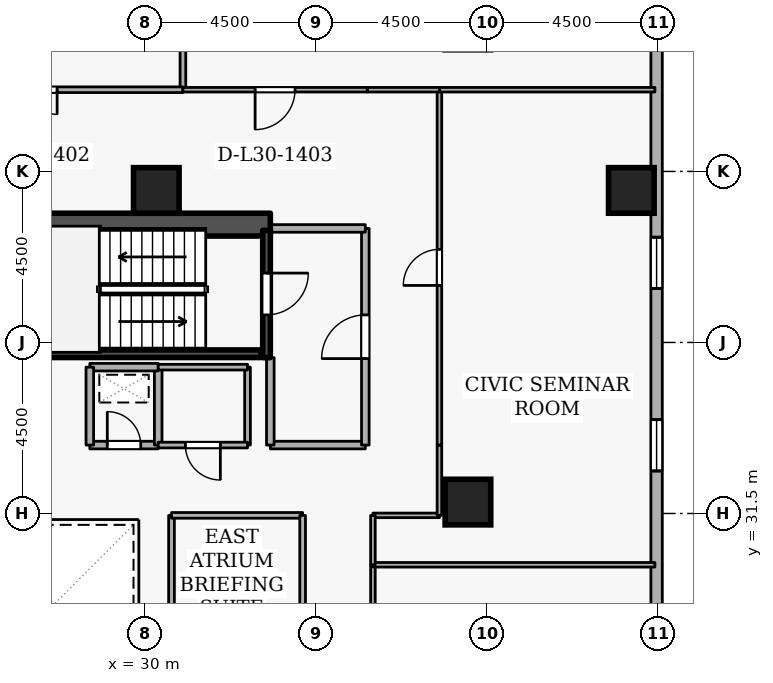
"""IFC4 building model, lengths in metres.
Left out: names, types, materials, properties, quantities, classifications, styles, units other than length and angle.
Written with IfcOpenShell. Run it as: python <this file> out.ifc"""

import sys

from ifc_helpers import new_model, si_unit, direction, frame, frame_2d, origin, origin_2d, place, context, subcontext, project, spatial, rectangle, extrude, element, fill, save


model = new_model("IFC4")
c1 = context("Model", 3, precision=1e-05, world=origin(), true_north=direction((0.0, 1.0)))
c2 = subcontext(c1, "Body", "Model", "MODEL_VIEW")
j1 = project(units=[si_unit("LENGTHUNIT", "METRE"), si_unit("PLANEANGLEUNIT", "RADIAN")], contexts=[c1])
p1 = place(None, origin())
s1 = spatial("IfcSite", under=j1, at=p1, CompositionType="ELEMENT")
p2 = place(p1, origin())
s2 = spatial("IfcBuilding", under=s1, at=p2, CompositionType="ELEMENT")
p3 = place(p2, frame((0.0, 0.0, 116.1)))
s3 = spatial("IfcBuildingStorey", under=s2, at=p3, CompositionType="ELEMENT", Elevation=116.1)
p4 = place(p3, frame((17.7, 39.1, 0.0), z_axis=(0.0, 0.0, 1.0), x_axis=(1.0, 0.0, 0.0)))
e1 = element("IfcWall", 1, at=p4, inside=s3, PredefinedType="SHEAR", context=c2, shape_type="SweptSolid", body=[
    extrude(rectangle(XDim=15.6, YDim=0.6, at=frame_2d((7.8, 0.0))), origin(), (0.0, 0.0, 1.0), 3.6),
])
for number, where, z_axis, x_axis in (
    (2, (42.8, 40.0, 0.0), (0.0, 0.0, 1.0), (1.0, 0.0, 0.0)),
    (3, (38.5, 31.8, 0.0), (0.0, 0.0, 1.0), (1.0, 0.0, 0.0)),
    (4, (30.3, 40.0, 0.0), (0.0, 0.0, 1.0), (1.0, 0.0, 0.0)),
):
    element("IfcColumn", number, at=place(p3, frame(where, z_axis=z_axis, x_axis=x_axis)), inside=s3, PredefinedType="COLUMN", context=c2, shape_type="SweptSolid", body=[
        extrude(rectangle(XDim=1.2, YDim=1.2, at=origin_2d()), origin(), (0.0, 0.0, 1.0), 3.6),
    ])
p5 = place(p3, frame((43.465, 11.619, 0.0), z_axis=(0.0, 0.0, 1.0), x_axis=(0.0, 1.0, 0.0)))
e5 = element("IfcWall", 5, at=p5, inside=s3, PredefinedType="STANDARD", context=c2, shape_type="SweptSolid", body=[
    extrude(rectangle(XDim=36.763, YDim=0.3, at=frame_2d((18.381, 0.0))), origin(), (0.0, 0.0, 1.0), 2.22),
])
p6 = place(p5, frame((6.6, 0.0, 0.72)))
e6 = element("IfcOpeningElement", 6, at=p6, cuts=e5, PredefinedType="OPENING", context=c2, shape_type="SweptSolid", body=[
    extrude(rectangle(XDim=1.35, YDim=1.05, at=frame_2d((0.675, 0.525))), frame((0.0, 0.16, 0.0), z_axis=(0.0, -1.0, 0.0), x_axis=(1.0, 0.0, 0.0)), (0.0, 0.0, 1.0), 0.32),
])
p7 = place(p5, frame((11.4, 0.0, 0.72)))
e7 = element("IfcOpeningElement", 7, at=p7, cuts=e5, PredefinedType="OPENING", context=c2, shape_type="SweptSolid", body=[
    extrude(rectangle(XDim=1.35, YDim=1.05, at=frame_2d((0.675, 0.525))), frame((0.0, 0.16, 0.0), z_axis=(0.0, -1.0, 0.0), x_axis=(1.0, 0.0, 0.0)), (0.0, 0.0, 1.0), 0.32),
])
p8 = place(p5, frame((21.0, 0.0, 0.72)))
e8 = element("IfcOpeningElement", 8, at=p8, cuts=e5, PredefinedType="OPENING", context=c2, shape_type="SweptSolid", body=[
    extrude(rectangle(XDim=1.35, YDim=1.05, at=frame_2d((0.675, 0.525))), frame((0.0, 0.16, 0.0), z_axis=(0.0, -1.0, 0.0), x_axis=(1.0, 0.0, 0.0)), (0.0, 0.0, 1.0), 0.32),
])
p9 = place(p5, frame((25.8, 0.0, 0.72)))
e9 = element("IfcOpeningElement", 9, at=p9, cuts=e5, PredefinedType="OPENING", context=c2, shape_type="SweptSolid", body=[
    extrude(rectangle(XDim=1.35, YDim=1.05, at=frame_2d((0.675, 0.525))), frame((0.0, 0.16, 0.0), z_axis=(0.0, -1.0, 0.0), x_axis=(1.0, 0.0, 0.0)), (0.0, 0.0, 1.0), 0.32),
])
p10 = place(p3, frame((33.2, 38.95, 0.0), z_axis=(0.0, 0.0, 1.0), x_axis=(0.0, -1.0, 0.0)))
e10 = element("IfcWall", 10, at=p10, inside=s3, PredefinedType="SHEAR", context=c2, shape_type="SweptSolid", body=[
    extrude(rectangle(XDim=3.35, YDim=0.2, at=frame_2d((1.675, 0.0))), origin(), (0.0, 0.0, 1.0), 3.6),
])
p11 = place(p10, frame((1.125, 0.0, 0.0)))
e11 = element("IfcOpeningElement", 11, at=p11, cuts=e10, PredefinedType="OPENING", context=c2, shape_type="SweptSolid", body=[
    extrude(rectangle(XDim=1.1, YDim=2.1, at=frame_2d((0.55, 1.05))), frame((0.0, 0.11, 0.0), z_axis=(0.0, -1.0, 0.0), x_axis=(1.0, 0.0, 0.0)), (0.0, 0.0, 1.0), 0.22),
])
p12 = place(p3, frame((25.95, 35.703, 0.0), z_axis=(0.0, 0.0, 1.0), x_axis=(1.0, 0.0, 0.0)))
e12 = element("IfcWall", 12, at=p12, inside=s3, PredefinedType="SHEAR", context=c2, shape_type="SweptSolid", body=[
    extrude(rectangle(XDim=7.1, YDim=0.2, at=frame_2d((3.55, 0.0))), origin(), (0.0, 0.0, 1.0), 3.6),
])
p13 = place(p3, frame((33.3, 33.3, 0.0), z_axis=(0.0, 0.0, 1.0), x_axis=(1.0, 0.0, 0.0)))
e13 = element("IfcWall", 13, at=p13, inside=s3, PredefinedType="STANDARD", context=c2, shape_type="SweptSolid", body=[
    extrude(rectangle(XDim=2.5, YDim=0.2, at=frame_2d((1.25, 0.0))), origin(), (0.0, 0.0, 1.0), 3.32),
])
p14 = place(p3, frame((35.8, 33.3, 0.0), z_axis=(0.0, 0.0, 1.0), x_axis=(0.0, 1.0, 0.0)))
e14 = element("IfcWall", 14, at=p14, inside=s3, PredefinedType="STANDARD", context=c2, shape_type="SweptSolid", body=[
    extrude(rectangle(XDim=5.7, YDim=0.2, at=frame_2d((2.85, 0.0))), origin(), (0.0, 0.0, 1.0), 3.32),
])
p15 = place(p14, frame((2.275, 0.0, 0.0)))
e15 = element("IfcOpeningElement", 15, at=p15, cuts=e14, PredefinedType="OPENING", context=c2, shape_type="SweptSolid", body=[
    extrude(rectangle(XDim=1.15, YDim=2.1, at=frame_2d((0.575, 1.05))), frame((0.0, 0.11, 0.0), z_axis=(0.0, -1.0, 0.0), x_axis=(1.0, 0.0, 0.0)), (0.0, 0.0, 1.0), 0.22),
])
p16 = place(p3, frame((35.8, 39.0, 0.0), z_axis=(0.0, 0.0, 1.0), x_axis=(-1.0, 0.0, 0.0)))
e16 = element("IfcWall", 16, at=p16, inside=s3, PredefinedType="STANDARD", context=c2, shape_type="SweptSolid", body=[
    extrude(rectangle(XDim=2.5, YDim=0.2, at=frame_2d((1.25, 0.0))), origin(), (0.0, 0.0, 1.0), 3.32),
])
p17 = place(p3, frame((33.3, 35.6, 0.0), z_axis=(0.0, 0.0, 1.0), x_axis=(0.0, -1.0, 0.0)))
e17 = element("IfcWall", 17, at=p17, inside=s3, PredefinedType="STANDARD", context=c2, shape_type="SweptSolid", body=[
    extrude(rectangle(XDim=2.3, YDim=0.2, at=frame_2d((1.15, 0.0))), origin(), (0.0, 0.0, 1.0), 2.525),
])
p18 = place(p3, frame((28.55, 33.3, 0.0), z_axis=(0.0, 0.0, 1.0), x_axis=(1.0, 0.0, 0.0)))
e18 = element("IfcWall", 18, at=p18, inside=s3, PredefinedType="STANDARD", context=c2, shape_type="SweptSolid", body=[
    extrude(rectangle(XDim=1.8, YDim=0.2, at=frame_2d((0.9, 0.0))), origin(), (0.0, 0.0, 1.0), 3.32),
])
p19 = place(p18, frame((0.46, 0.0, 0.0)))
e19 = element("IfcOpeningElement", 19, at=p19, cuts=e18, PredefinedType="OPENING", context=c2, shape_type="SweptSolid", body=[
    extrude(rectangle(XDim=0.88, YDim=2.04, at=frame_2d((0.44, 1.02))), frame((0.0, 0.11, 0.0), z_axis=(0.0, -1.0, 0.0), x_axis=(1.0, 0.0, 0.0)), (0.0, 0.0, 1.0), 0.22),
])
p20 = place(p3, frame((30.35, 33.3, 0.0), z_axis=(0.0, 0.0, 1.0), x_axis=(0.0, 1.0, 0.0)))
e20 = element("IfcWall", 20, at=p20, inside=s3, PredefinedType="STANDARD", context=c2, shape_type="SweptSolid", body=[
    extrude(rectangle(XDim=2.05, YDim=0.2, at=frame_2d((1.025, 0.0))), origin(), (0.0, 0.0, 1.0), 3.32),
])
p21 = place(p3, frame((30.35, 35.35, 0.0), z_axis=(0.0, 0.0, 1.0), x_axis=(-1.0, 0.0, 0.0)))
e21 = element("IfcWall", 21, at=p21, inside=s3, PredefinedType="STANDARD", context=c2, shape_type="SweptSolid", body=[
    extrude(rectangle(XDim=1.8, YDim=0.2, at=frame_2d((0.9, 0.0))), origin(), (0.0, 0.0, 1.0), 3.32),
])
p22 = place(p3, frame((28.55, 35.35, 0.0), z_axis=(0.0, 0.0, 1.0), x_axis=(0.0, -1.0, 0.0)))
e22 = element("IfcWall", 22, at=p22, inside=s3, PredefinedType="STANDARD", context=c2, shape_type="SweptSolid", body=[
    extrude(rectangle(XDim=2.05, YDim=0.2, at=frame_2d((1.025, 0.0))), origin(), (0.0, 0.0, 1.0), 3.32),
])
p23 = place(p3, frame((32.7, 35.35, 0.0), z_axis=(0.0, 0.0, 1.0), x_axis=(0.0, -1.0, 0.0)))
e23 = element("IfcWall", 23, at=p23, inside=s3, PredefinedType="PARTITIONING", context=c2, shape_type="SweptSolid", body=[
    extrude(rectangle(XDim=2.05, YDim=0.15, at=frame_2d((1.025, 0.0))), origin(), (0.0, 0.0, 1.0), 2.525),
])
p24 = place(p3, frame((32.7, 33.3, 0.0), z_axis=(0.0, 0.0, 1.0), x_axis=(-1.0, 0.0, 0.0)))
e24 = element("IfcWall", 24, at=p24, inside=s3, PredefinedType="PARTITIONING", context=c2, shape_type="SweptSolid", body=[
    extrude(rectangle(XDim=2.35, YDim=0.15, at=frame_2d((1.175, 0.0))), origin(), (0.0, 0.0, 1.0), 3.32),
])
p25 = place(p24, frame((0.715, 0.0, 0.0)))
e25 = element("IfcOpeningElement", 25, at=p25, cuts=e24, PredefinedType="OPENING", context=c2, shape_type="SweptSolid", body=[
    extrude(rectangle(XDim=0.92, YDim=2.08, at=frame_2d((0.46, 1.04))), frame((0.0, 0.085, 0.0), z_axis=(0.0, -1.0, 0.0), x_axis=(1.0, 0.0, 0.0)), (0.0, 0.0, 1.0), 0.17),
])
p26 = place(p3, frame((30.35, 35.35, 0.0), z_axis=(0.0, 0.0, 1.0), x_axis=(1.0, 0.0, 0.0)))
e26 = element("IfcWall", 26, at=p26, inside=s3, PredefinedType="PARTITIONING", context=c2, shape_type="SweptSolid", body=[
    extrude(rectangle(XDim=2.35, YDim=0.15, at=frame_2d((1.175, 0.0))), origin(), (0.0, 0.0, 1.0), 3.32),
])
p27 = place(p3, frame((36.0, 27.0, 0.0), z_axis=(0.0, 0.0, 1.0), x_axis=(0.0, 1.0, 0.0)))
e27 = element("IfcWall", 27, at=p27, inside=s3, PredefinedType="PARTITIONING", context=c2, shape_type="SweptSolid", body=[
    extrude(rectangle(XDim=3.15, YDim=0.12, at=frame_2d((1.575, 0.0))), origin(), (0.0, 0.0, 1.0), 3.32),
])
p28 = place(p27, frame((1.1, 0.0, 0.0)))
e28 = element("IfcOpeningElement", 28, at=p28, cuts=e27, PredefinedType="OPENING", context=c2, shape_type="SweptSolid", body=[
    extrude(rectangle(XDim=0.95, YDim=2.1, at=frame_2d((0.475, 1.05))), frame((0.0, 0.07, 0.0), z_axis=(0.0, -1.0, 0.0), x_axis=(1.0, 0.0, 0.0)), (0.0, 0.0, 1.0), 0.14),
])
p29 = place(p3, frame((36.0, 30.15, 0.0), z_axis=(0.0, 0.0, 1.0), x_axis=(1.0, 0.0, 0.0)))
e29 = element("IfcWall", 29, at=p29, inside=s3, PredefinedType="PARTITIONING", context=c2, shape_type="SweptSolid", body=[
    extrude(rectangle(XDim=7.42, YDim=0.12, at=frame_2d((3.71, 0.0))), origin(), (0.0, 0.0, 1.0), 3.32),
])
p30 = place(p3, frame((36.0, 31.45, 0.0), z_axis=(0.0, 0.0, 1.0), x_axis=(1.0, 0.0, 0.0)))
e30 = element("IfcWall", 30, at=p30, inside=s3, PredefinedType="PARTITIONING", context=c2, shape_type="SweptSolid", body=[
    extrude(rectangle(XDim=1.75, YDim=0.12, at=frame_2d((0.875, 0.0))), origin(), (0.0, 0.0, 1.0), 3.32),
])
p31 = place(p3, frame((37.75, 31.45, 0.0), z_axis=(0.0, 0.0, 1.0), x_axis=(0.0, 1.0, 0.0)))
e31 = element("IfcWall", 31, at=p31, inside=s3, PredefinedType="PARTITIONING", context=c2, shape_type="SweptSolid", body=[
    extrude(rectangle(XDim=1.85, YDim=0.12, at=frame_2d((0.925, 0.0))), origin(), (0.0, 0.0, 1.0), 3.32),
])
p32 = place(p3, frame((37.75, 33.3, 0.0), z_axis=(0.0, 0.0, 1.0), x_axis=(0.0, 1.0, 0.0)))
e32 = element("IfcWall", 32, at=p32, inside=s3, PredefinedType="PARTITIONING", context=c2, shape_type="SweptSolid", body=[
    extrude(rectangle(XDim=9.35, YDim=0.12, at=frame_2d((4.675, 0.0))), origin(), (0.0, 0.0, 1.0), 3.32),
])
p33 = place(p32, frame((4.2, 0.0, 0.0)))
e33 = element("IfcOpeningElement", 33, at=p33, cuts=e32, PredefinedType="OPENING", context=c2, shape_type="SweptSolid", body=[
    extrude(rectangle(XDim=0.95, YDim=2.1, at=frame_2d((0.475, 1.05))), frame((0.0, 0.07, 0.0), z_axis=(0.0, -1.0, 0.0), x_axis=(1.0, 0.0, 0.0)), (0.0, 0.0, 1.0), 0.14),
])
p34 = place(p3, frame((37.75, 42.65, 0.0), z_axis=(0.0, 0.0, 1.0), x_axis=(1.0, 0.0, 0.0)))
e34 = element("IfcWall", 34, at=p34, inside=s3, PredefinedType="PARTITIONING", context=c2, shape_type="SweptSolid", body=[
    extrude(rectangle(XDim=5.67, YDim=0.12, at=frame_2d((2.835, 0.0))), origin(), (0.0, 0.0, 1.0), 3.32),
])
p35 = place(p3, frame((36.0, 30.15, 0.0), z_axis=(0.0, 0.0, 1.0), x_axis=(0.0, 1.0, 0.0)))
e35 = element("IfcWall", 35, at=p35, inside=s3, PredefinedType="PARTITIONING", context=c2, shape_type="SweptSolid", body=[
    extrude(rectangle(XDim=1.3, YDim=0.12, at=frame_2d((0.65, 0.0))), origin(), (0.0, 0.0, 1.0), 3.32),
])
p36 = place(p3, frame((30.7, 22.55, 0.0), z_axis=(0.0, 0.0, 1.0), x_axis=(0.0, 1.0, 0.0)))
e36 = element("IfcWall", 36, at=p36, inside=s3, PredefinedType="PARTITIONING", context=c2, shape_type="SweptSolid", body=[
    extrude(rectangle(XDim=8.9, YDim=0.15, at=frame_2d((4.45, 0.0))), origin(), (0.0, 0.0, 1.0), 3.32),
])
p37 = place(p3, frame((30.7, 31.45, 0.0), z_axis=(0.0, 0.0, 1.0), x_axis=(1.0, 0.0, 0.0)))
e37 = element("IfcWall", 37, at=p37, inside=s3, PredefinedType="PARTITIONING", context=c2, shape_type="SweptSolid", body=[
    extrude(rectangle(XDim=3.45, YDim=0.15, at=frame_2d((1.725, 0.0))), origin(), (0.0, 0.0, 1.0), 3.32),
])
p38 = place(p3, frame((34.15, 31.45, 0.0), z_axis=(0.0, 0.0, 1.0), x_axis=(0.0, -1.0, 0.0)))
e38 = element("IfcWall", 38, at=p38, inside=s3, PredefinedType="PARTITIONING", context=c2, shape_type="SweptSolid", body=[
    extrude(rectangle(XDim=8.9, YDim=0.15, at=frame_2d((4.45, 0.0))), origin(), (0.0, 0.0, 1.0), 3.32),
])
p39 = place(p38, frame((3.8, 0.0, 0.0)))
e39 = element("IfcOpeningElement", 39, at=p39, cuts=e38, PredefinedType="OPENING", context=c2, shape_type="SweptSolid", body=[
    extrude(rectangle(XDim=1.3, YDim=2.12, at=frame_2d((0.65, 1.06))), frame((0.0, 0.085, 0.0), z_axis=(0.0, -1.0, 0.0), x_axis=(1.0, 0.0, 0.0)), (0.0, 0.0, 1.0), 0.17),
])
p40 = place(p3, frame((31.0, 50.92, 0.0), z_axis=(0.0, 0.0, 1.0), x_axis=(0.0, -1.0, 0.0)))
e40 = element("IfcWall", 40, at=p40, inside=s3, PredefinedType="PARTITIONING", context=c2, shape_type="SweptSolid", body=[
    extrude(rectangle(XDim=8.27, YDim=0.15, at=frame_2d((4.135, 0.0))), origin(), (0.0, 0.0, 1.0), 3.32),
])
p41 = place(p3, frame((31.0, 42.65, 0.0), z_axis=(0.0, 0.0, 1.0), x_axis=(-1.0, 0.0, 0.0)))
e41 = element("IfcWall", 41, at=p41, inside=s3, PredefinedType="PARTITIONING", context=c2, shape_type="SweptSolid", body=[
    extrude(rectangle(XDim=11.0, YDim=0.15, at=frame_2d((5.5, 0.0))), origin(), (0.0, 0.0, 1.0), 3.32),
])
p42 = place(p41, frame((3.31, 0.0, 0.0)))
e42 = element("IfcOpeningElement", 42, at=p42, cuts=e41, PredefinedType="OPENING", context=c2, shape_type="SweptSolid", body=[
    extrude(rectangle(XDim=1.3, YDim=2.12, at=frame_2d((0.65, 1.06))), frame((0.0, 0.085, 0.0), z_axis=(0.0, -1.0, 0.0), x_axis=(1.0, 0.0, 0.0)), (0.0, 0.0, 1.0), 0.17),
])
p43 = place(p3, frame((37.75, 42.65, 0.0), z_axis=(0.0, 0.0, 1.0), x_axis=(-1.0, 0.0, 0.0)))
e43 = element("IfcWall", 43, at=p43, inside=s3, PredefinedType="PARTITIONING", context=c2, shape_type="SweptSolid", body=[
    extrude(rectangle(XDim=1.9, YDim=0.12, at=frame_2d((0.95, 0.0))), origin(), (0.0, 0.0, 1.0), 3.32),
])
p44 = place(p3, frame((35.85, 42.65, 0.0), z_axis=(0.0, 0.0, 1.0), x_axis=(-1.0, 0.0, 0.0)))
e44 = element("IfcWall", 44, at=p44, inside=s3, PredefinedType="PARTITIONING", context=c2, shape_type="SweptSolid", body=[
    extrude(rectangle(XDim=4.85, YDim=0.12, at=frame_2d((2.425, 0.0))), origin(), (0.0, 0.0, 1.0), 2.875),
])
p45 = place(p44, frame((1.9, 0.0, 0.0)))
e45 = element("IfcOpeningElement", 45, at=p45, cuts=e44, PredefinedType="OPENING", context=c2, shape_type="SweptSolid", body=[
    extrude(rectangle(XDim=1.05, YDim=2.1, at=frame_2d((0.525, 1.05))), frame((0.0, 0.07, 0.0), z_axis=(0.0, -1.0, 0.0), x_axis=(1.0, 0.0, 0.0)), (0.0, 0.0, 1.0), 0.14),
])
p46 = place(p8, origin())
e46 = element("IfcWindow", 46, at=p46, inside=s3, PartitioningType="SINGLE_PANEL", PredefinedType="WINDOW", context=c2, shape_type="SweptSolid", body=[
    extrude(rectangle(XDim=1.35, YDim=1.05, at=frame_2d((0.675, 0.525))), frame((0.0, 0.03, 0.0), z_axis=(0.0, -1.0, 0.0), x_axis=(1.0, 0.0, 0.0)), (0.0, 0.0, 1.0), 0.06),
])
fill(e8, e46)
p47 = place(p9, origin())
e47 = element("IfcWindow", 47, at=p47, inside=s3, PartitioningType="SINGLE_PANEL", PredefinedType="WINDOW", context=c2, shape_type="SweptSolid", body=[
    extrude(rectangle(XDim=1.35, YDim=1.05, at=frame_2d((0.675, 0.525))), frame((0.0, 0.03, 0.0), z_axis=(0.0, -1.0, 0.0), x_axis=(1.0, 0.0, 0.0)), (0.0, 0.0, 1.0), 0.06),
])
fill(e9, e47)
p48 = place(p11, origin())
e48 = element("IfcDoor", 48, at=p48, inside=s3, OperationType="SINGLE_SWING_LEFT", PredefinedType="DOOR", context=c2, shape_type="SweptSolid", body=[
    extrude(rectangle(XDim=1.1, YDim=2.1, at=frame_2d((0.55, 1.05))), frame((0.0, 0.025, 0.0), z_axis=(0.0, -1.0, 0.0), x_axis=(1.0, 0.0, 0.0)), (0.0, 0.0, 1.0), 0.05),
])
fill(e11, e48)
p49 = place(p15, origin())
e49 = element("IfcDoor", 49, at=p49, inside=s3, OperationType="SINGLE_SWING_LEFT", PredefinedType="DOOR", context=c2, shape_type="SweptSolid", body=[
    extrude(rectangle(XDim=1.15, YDim=2.1, at=frame_2d((0.575, 1.05))), frame((0.0, 0.025, 0.0), z_axis=(0.0, -1.0, 0.0), x_axis=(1.0, 0.0, 0.0)), (0.0, 0.0, 1.0), 0.05),
])
fill(e15, e49)
p50 = place(p19, origin())
e50 = element("IfcDoor", 50, at=p50, inside=s3, OperationType="SINGLE_SWING_LEFT", PredefinedType="DOOR", context=c2, shape_type="SweptSolid", body=[
    extrude(rectangle(XDim=0.88, YDim=2.04, at=frame_2d((0.44, 1.02))), frame((0.0, 0.025, 0.0), z_axis=(0.0, -1.0, 0.0), x_axis=(1.0, 0.0, 0.0)), (0.0, 0.0, 1.0), 0.05),
])
fill(e19, e50)
p51 = place(p25, origin())
e51 = element("IfcDoor", 51, at=p51, inside=s3, OperationType="SINGLE_SWING_LEFT", PredefinedType="DOOR", context=c2, shape_type="SweptSolid", body=[
    extrude(rectangle(XDim=0.92, YDim=2.08, at=frame_2d((0.46, 1.04))), frame((0.0, 0.025, 0.0), z_axis=(0.0, -1.0, 0.0), x_axis=(1.0, 0.0, 0.0)), (0.0, 0.0, 1.0), 0.05),
])
fill(e25, e51)
p52 = place(p33, origin())
e52 = element("IfcDoor", 52, at=p52, inside=s3, OperationType="SINGLE_SWING_LEFT", PredefinedType="DOOR", context=c2, shape_type="SweptSolid", body=[
    extrude(rectangle(XDim=0.95, YDim=2.1, at=frame_2d((0.475, 1.05))), frame((0.0, 0.025, 0.0), z_axis=(0.0, -1.0, 0.0), x_axis=(1.0, 0.0, 0.0)), (0.0, 0.0, 1.0), 0.05),
])
fill(e33, e52)
p53 = place(p42, origin())
e53 = element("IfcDoor", 53, at=p53, inside=s3, OperationType="DOUBLE_DOOR_SINGLE_SWING", PredefinedType="DOOR", context=c2, shape_type="SweptSolid", body=[
    extrude(rectangle(XDim=1.3, YDim=2.12, at=frame_2d((0.65, 1.06))), frame((0.0, 0.025, 0.0), z_axis=(0.0, -1.0, 0.0), x_axis=(1.0, 0.0, 0.0)), (0.0, 0.0, 1.0), 0.05),
])
fill(e42, e53)
p54 = place(p45, origin())
e54 = element("IfcDoor", 54, at=p54, inside=s3, OperationType="SINGLE_SWING_RIGHT", PredefinedType="DOOR", context=c2, shape_type="SweptSolid", body=[
    extrude(rectangle(XDim=1.05, YDim=2.1, at=frame_2d((0.525, 1.05))), frame((0.0, 0.025, 0.0), z_axis=(0.0, -1.0, 0.0), x_axis=(1.0, 0.0, 0.0)), (0.0, 0.0, 1.0), 0.05),
])
fill(e45, e54)
save(model, sys.argv[1])
